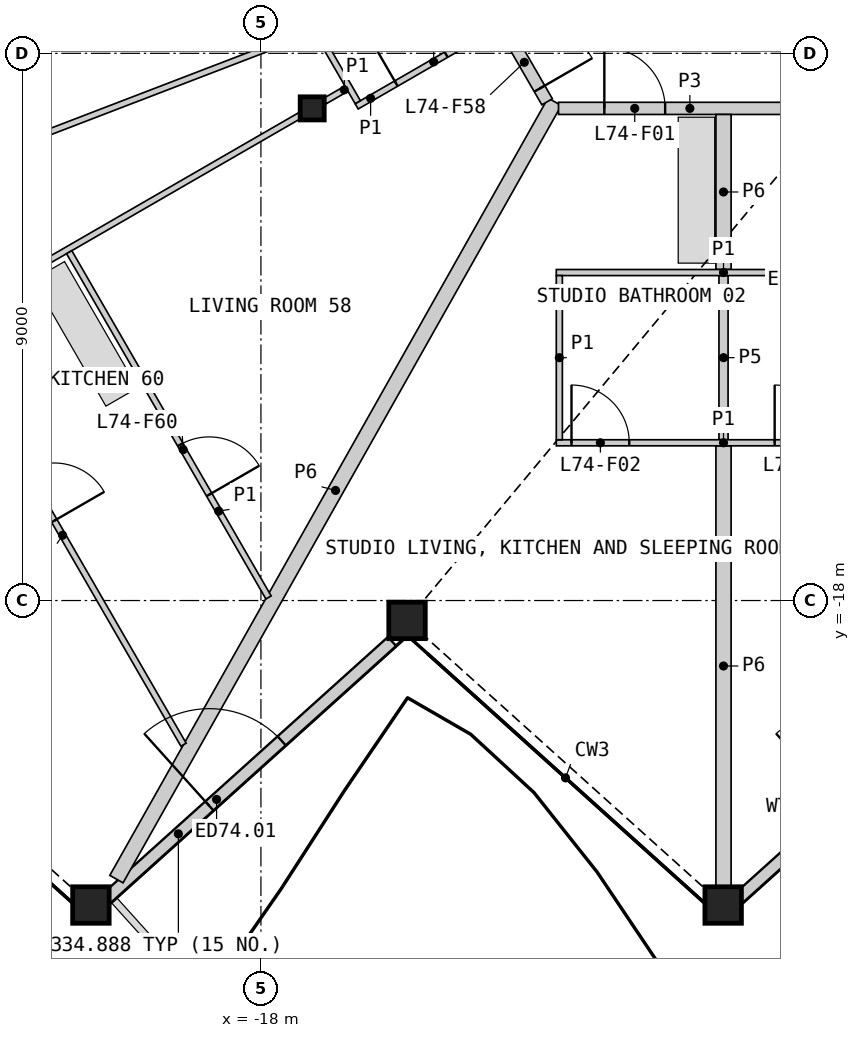
"""IFC4 building model, lengths in metres.
Left out: names, types, materials, properties, quantities, classifications, styles, units other than length and angle.
Written with IfcOpenShell. Run it as: python <this file> out.ifc"""

import sys

from ifc_helpers import new_model, si_unit, direction, frame, frame_2d, origin, origin_2d, place, context, subcontext, project, spatial, rectangle, hollow_rectangle, i_section, extrude, element, fill, save


model = new_model("IFC4")
c1 = context("Model", 3, precision=1e-05, world=origin(), true_north=direction((0.0, 1.0)))
c2 = subcontext(c1, "Body", "Model", "MODEL_VIEW")
j1 = project(units=[si_unit("LENGTHUNIT", "METRE"), si_unit("PLANEANGLEUNIT", "RADIAN")], contexts=[c1])
p1 = place(None, origin())
s1 = spatial("IfcSite", under=j1, at=p1, CompositionType="ELEMENT")
p2 = place(p1, origin())
s2 = spatial("IfcBuilding", under=s1, at=p2, CompositionType="ELEMENT")
p3 = place(p2, frame((0.0, 0.0, 332.4)))
s3 = spatial("IfcBuildingStorey", under=s2, at=p3, CompositionType="ELEMENT", Elevation=332.4)
for number, where, z_axis, x_axis in (
    (1, (-20.796, -23.008, 0.0), (0.0, 0.0, 1.0), (1.0, 0.0, 0.0)),
    (2, (-15.597, -18.327, 0.0), (0.0, 0.0, 1.0), (1.0, 0.0, 0.0)),
    (3, (-10.398, -23.008, 0.0), (0.0, 0.0, 1.0), (1.0, 0.0, 0.0)),
):
    element("IfcColumn", number, at=place(p3, frame(where, z_axis=z_axis, x_axis=x_axis)), inside=s3, PredefinedType="COLUMN", context=c2, shape_type="SweptSolid", body=[
        extrude(hollow_rectangle(XDim=0.6, YDim=0.6, WallThickness=0.04, at=origin_2d()), origin(), (0.0, 0.0, 1.0), 3.4),
    ])
p4 = place(p3, frame((-17.157, -9.906, 0.0), z_axis=(0.0, 0.0, 1.0), x_axis=(1.0, 0.0, 0.0)))
e4 = element("IfcColumn", 4, at=p4, inside=s3, PredefinedType="COLUMN", context=c2, shape_type="SweptSolid", body=[
    extrude(i_section(OverallWidth=0.396, OverallDepth=0.381, WebThickness=0.019, FlangeThickness=0.03, at=origin_2d()), origin(), (0.0, 0.0, 1.0), 3.4),
])
p5 = place(p3, frame((-20.53, -22.892, 0.0), z_axis=(0.0, 0.0, 1.0), x_axis=(0.743134328827, 0.669142263887, 0.0)))
e5 = element("IfcWall", 5, at=p5, inside=s3, PredefinedType="SOLIDWALL", context=c2, shape_type="SweptSolid", body=[
    extrude(rectangle(XDim=6.305, YDim=0.2, at=frame_2d((3.153, 0.0))), origin(), (0.0, 0.0, 1.0), 2.488),
])
p6 = place(p5, frame((2.262, 0.0, 0.0)))
e6 = element("IfcOpeningElement", 6, at=p6, cuts=e5, PredefinedType="OPENING", context=c2, shape_type="SweptSolid", body=[
    extrude(rectangle(XDim=1.6, YDim=2.25, at=frame_2d((0.8, 1.125))), frame((0.0, 0.11, 0.0), z_axis=(0.0, -1.0, 0.0), x_axis=(1.0, 0.0, 0.0)), (0.0, 0.0, 1.0), 0.22),
])
p7 = place(p3, frame((-10.137, -22.892, 0.0), z_axis=(0.0, 0.0, 1.0), x_axis=(0.743147981531, 0.669127101189, 0.0)))
e7 = element("IfcWall", 7, at=p7, inside=s3, PredefinedType="SOLIDWALL", context=c2, shape_type="SweptSolid", body=[
    extrude(rectangle(XDim=6.313, YDim=0.2, at=frame_2d((3.156, 0.0))), origin(), (0.0, 0.0, 1.0), 2.488),
])
p8 = place(p7, frame((2.262, 0.0, 0.0)))
e8 = element("IfcOpeningElement", 8, at=p8, cuts=e7, PredefinedType="OPENING", context=c2, shape_type="SweptSolid", body=[
    extrude(rectangle(XDim=1.6, YDim=2.25, at=frame_2d((0.8, 1.125))), frame((0.0, 0.11, 0.0), z_axis=(0.0, -1.0, 0.0), x_axis=(1.0, 0.0, 0.0)), (0.0, 0.0, 1.0), 0.22),
])
p9 = place(p3, frame((-20.376, -22.582, 0.0), z_axis=(0.0, 0.0, 1.0), x_axis=(0.491057132664, 0.871127368678, 0.0)))
e9 = element("IfcWall", 9, at=p9, inside=s3, PredefinedType="PARTITIONING", context=c2, shape_type="SweptSolid", body=[
    extrude(rectangle(XDim=14.677, YDim=0.25, at=frame_2d((7.338, 0.0))), origin(), (0.0, 0.0, 1.0), 2.33),
])
p10 = place(p3, frame((-10.393, -22.698, 0.0), z_axis=(0.0, 0.0, 1.0), x_axis=(0.0, 1.0, 0.0)))
e10 = element("IfcWall", 10, at=p10, inside=s3, PredefinedType="PARTITIONING", context=c2, shape_type="SweptSolid", body=[
    extrude(rectangle(XDim=7.242, YDim=0.25, at=frame_2d((3.621, 0.0))), origin(), (0.0, 0.0, 1.0), 2.33),
])
p11 = place(p3, frame((-13.106, -9.906, 0.0), z_axis=(0.0, 0.0, 1.0), x_axis=(1.0, 0.0, 0.0)))
e11 = element("IfcWall", 11, at=p11, inside=s3, PredefinedType="PARTITIONING", context=c2, shape_type="SweptSolid", body=[
    extrude(rectangle(XDim=4.32, YDim=0.2, at=frame_2d((2.16, 0.0))), origin(), (0.0, 0.0, 1.0), 3.1),
])
p12 = place(p11, frame((0.753, 0.0, 0.0)))
e12 = element("IfcOpeningElement", 12, at=p12, cuts=e11, PredefinedType="OPENING", context=c2, shape_type="SweptSolid", body=[
    extrude(rectangle(XDim=1.0, YDim=2.1, at=frame_2d((0.5, 1.05))), frame((0.0, 0.11, 0.0), z_axis=(0.0, -1.0, 0.0), x_axis=(1.0, 0.0, 0.0)), (0.0, 0.0, 1.0), 0.22),
])
p13 = place(p3, frame((-15.131, -6.614, 0.0), z_axis=(0.0, 0.0, 1.0), x_axis=(0.499967746641, -0.866044024469, 0.0)))
e13 = element("IfcWall", 13, at=p13, inside=s3, PredefinedType="PARTITIONING", context=c2, shape_type="SweptSolid", body=[
    extrude(rectangle(XDim=3.676, YDim=0.2, at=frame_2d((1.838, 0.0))), origin(), (0.0, 0.0, 1.0), 3.1),
])
p14 = place(p13, frame((2.426, 0.0, 0.0)))
e14 = element("IfcOpeningElement", 14, at=p14, cuts=e13, PredefinedType="OPENING", context=c2, shape_type="SweptSolid", body=[
    extrude(rectangle(XDim=1.0, YDim=2.1, at=frame_2d((0.5, 1.05))), frame((0.0, 0.11, 0.0), z_axis=(0.0, -1.0, 0.0), x_axis=(1.0, 0.0, 0.0)), (0.0, 0.0, 1.0), 0.22),
])
p15 = place(p3, frame((-10.393, -12.556, 0.0), z_axis=(0.0, 0.0, 1.0), x_axis=(0.0, 1.0, 0.0)))
e15 = element("IfcWall", 15, at=p15, inside=s3, PredefinedType="PARTITIONING", context=c2, shape_type="SweptSolid", body=[
    extrude(rectangle(XDim=2.55, YDim=0.25, at=frame_2d((1.275, 0.0))), origin(), (0.0, 0.0, 1.0), 2.33),
])
p16 = place(p3, frame((-10.393, -15.356, 0.0), z_axis=(0.0, 0.0, 1.0), x_axis=(0.0, 1.0, 0.0)))
e16 = element("IfcWall", 16, at=p16, inside=s3, PredefinedType="PLUMBINGWALL", context=c2, shape_type="SweptSolid", body=[
    extrude(rectangle(XDim=2.7, YDim=0.15, at=frame_2d((1.35, 0.0))), origin(), (0.0, 0.0, 1.0), 2.33),
])
p17 = place(p3, frame((-28.631, -13.039, 0.0), z_axis=(0.0, 0.0, 1.0), x_axis=(0.933581130309, 0.358366116048, 0.0)))
e17 = element("IfcWall", 17, at=p17, inside=s3, PredefinedType="PARTITIONING", context=c2, shape_type="SweptSolid", body=[
    extrude(rectangle(XDim=12.306, YDim=0.1, at=frame_2d((6.153, 0.0))), origin(), (0.0, 0.0, 1.0), 2.33),
])
p18 = place(p17, frame((5.276, 0.0, 0.0)))
e18 = element("IfcOpeningElement", 18, at=p18, cuts=e17, PredefinedType="OPENING", context=c2, shape_type="SweptSolid", body=[
    extrude(rectangle(XDim=0.95, YDim=2.1, at=frame_2d((0.475, 1.05))), frame((0.0, 0.06, 0.0), z_axis=(0.0, -1.0, 0.0), x_axis=(1.0, 0.0, 0.0)), (0.0, 0.0, 1.0), 0.12),
])
p19 = place(p3, frame((-27.122, -15.659, 0.0), z_axis=(0.0, 0.0, 1.0), x_axis=(0.866021046153, 0.500007547564, 0.0)))
e19 = element("IfcWall", 19, at=p19, inside=s3, PredefinedType="PARTITIONING", context=c2, shape_type="SweptSolid", body=[
    extrude(rectangle(XDim=11.267, YDim=0.1, at=frame_2d((5.634, 0.0))), origin(), (0.0, 0.0, 1.0), 2.33),
])
p20 = place(p19, frame((1.552, 0.0, 0.0)))
e20 = element("IfcOpeningElement", 20, at=p20, cuts=e19, PredefinedType="OPENING", context=c2, shape_type="SweptSolid", body=[
    extrude(rectangle(XDim=0.95, YDim=2.1, at=frame_2d((0.475, 1.05))), frame((0.0, 0.06, 0.0), z_axis=(0.0, -1.0, 0.0), x_axis=(1.0, 0.0, 0.0)), (0.0, 0.0, 1.0), 0.12),
])
p21 = place(p3, frame((-23.251, -13.482, 0.0), z_axis=(0.0, 0.0, 1.0), x_axis=(0.500017325895, -0.866015400443, 0.0)))
e21 = element("IfcWall", 21, at=p21, inside=s3, PredefinedType="PARTITIONING", context=c2, shape_type="SweptSolid", body=[
    extrude(rectangle(XDim=7.955, YDim=0.1, at=frame_2d((3.978, 0.0))), origin(), (0.0, 0.0, 1.0), 2.33),
])
p22 = place(p21, frame((2.752, 0.0, 0.0)))
e22 = element("IfcOpeningElement", 22, at=p22, cuts=e21, PredefinedType="OPENING", context=c2, shape_type="SweptSolid", body=[
    extrude(rectangle(XDim=0.95, YDim=2.1, at=frame_2d((0.475, 1.05))), frame((0.0, 0.06, 0.0), z_axis=(0.0, -1.0, 0.0), x_axis=(1.0, 0.0, 0.0)), (0.0, 0.0, 1.0), 0.12),
])
p23 = place(p3, frame((-21.154, -12.271, 0.0), z_axis=(0.0, 0.0, 1.0), x_axis=(0.500011451804, -0.866018791981, 0.0)))
e23 = element("IfcWall", 23, at=p23, inside=s3, PredefinedType="PARTITIONING", context=c2, shape_type="SweptSolid", body=[
    extrude(rectangle(XDim=6.557, YDim=0.1, at=frame_2d((3.278, 0.0))), origin(), (0.0, 0.0, 1.0), 2.33),
])
p24 = place(p23, frame((3.655, 0.0, 0.0)))
e24 = element("IfcOpeningElement", 24, at=p24, cuts=e23, PredefinedType="OPENING", context=c2, shape_type="SweptSolid", body=[
    extrude(rectangle(XDim=0.95, YDim=2.1, at=frame_2d((0.475, 1.05))), frame((0.0, 0.06, 0.0), z_axis=(0.0, -1.0, 0.0), x_axis=(1.0, 0.0, 0.0)), (0.0, 0.0, 1.0), 0.12),
])
p25 = place(p3, frame((-13.143, -12.606, 0.0), z_axis=(0.0, 0.0, 1.0), x_axis=(1.0, 0.0, 0.0)))
e25 = element("IfcWall", 25, at=p25, inside=s3, PredefinedType="PARTITIONING", context=c2, shape_type="SweptSolid", body=[
    extrude(rectangle(XDim=5.5, YDim=0.1, at=frame_2d((2.75, 0.0))), origin(), (0.0, 0.0, 1.0), 2.33),
])
p26 = place(p3, frame((-13.143, -15.406, 0.0), z_axis=(0.0, 0.0, 1.0), x_axis=(1.0, 0.0, 0.0)))
e26 = element("IfcWall", 26, at=p26, inside=s3, PredefinedType="PARTITIONING", context=c2, shape_type="SweptSolid", body=[
    extrude(rectangle(XDim=5.5, YDim=0.1, at=frame_2d((2.75, 0.0))), origin(), (0.0, 0.0, 1.0), 2.33),
])
p27 = place(p26, frame((0.25, 0.0, 0.0)))
e27 = element("IfcOpeningElement", 27, at=p27, cuts=e26, PredefinedType="OPENING", context=c2, shape_type="SweptSolid", body=[
    extrude(rectangle(XDim=0.95, YDim=2.1, at=frame_2d((0.475, 1.05))), frame((0.0, 0.06, 0.0), z_axis=(0.0, -1.0, 0.0), x_axis=(1.0, 0.0, 0.0)), (0.0, 0.0, 1.0), 0.12),
])
p28 = place(p26, frame((3.591, 0.0, 0.0)))
e28 = element("IfcOpeningElement", 28, at=p28, cuts=e26, PredefinedType="OPENING", context=c2, shape_type="SweptSolid", body=[
    extrude(rectangle(XDim=0.95, YDim=2.1, at=frame_2d((0.475, 1.05))), frame((0.0, 0.06, 0.0), z_axis=(0.0, -1.0, 0.0), x_axis=(1.0, 0.0, 0.0)), (0.0, 0.0, 1.0), 0.12),
])
p29 = place(p3, frame((-13.093, -15.356, 0.0), z_axis=(0.0, 0.0, 1.0), x_axis=(0.0, 1.0, 0.0)))
e29 = element("IfcWall", 29, at=p29, inside=s3, PredefinedType="PARTITIONING", context=c2, shape_type="SweptSolid", body=[
    extrude(rectangle(XDim=2.7, YDim=0.1, at=frame_2d((1.35, 0.0))), origin(), (0.0, 0.0, 1.0), 2.33),
])
p30 = place(p3, frame((-16.426, -9.872, 0.0), z_axis=(0.0, 0.0, 1.0), x_axis=(0.866029095148, 0.499993606316, 0.0)))
e30 = element("IfcWall", 30, at=p30, inside=s3, PredefinedType="PARTITIONING", context=c2, shape_type="SweptSolid", body=[
    extrude(rectangle(XDim=2.65, YDim=0.1, at=frame_2d((1.325, 0.0))), origin(), (0.0, 0.0, 1.0), 2.33),
])
p31 = place(p30, frame((0.75, 0.0, 0.0)))
e31 = element("IfcOpeningElement", 31, at=p31, cuts=e30, PredefinedType="OPENING", context=c2, shape_type="SweptSolid", body=[
    extrude(rectangle(XDim=0.95, YDim=2.1, at=frame_2d((0.475, 1.05))), frame((0.0, 0.06, 0.0), z_axis=(0.0, -1.0, 0.0), x_axis=(1.0, 0.0, 0.0)), (0.0, 0.0, 1.0), 0.12),
])
p32 = place(p3, frame((-17.507, -7.899, 0.0), z_axis=(0.0, 0.0, 1.0), x_axis=(0.499946605688, -0.86605622881, 0.0)))
e32 = element("IfcWall", 32, at=p32, inside=s3, PredefinedType="PARTITIONING", context=c2, shape_type="SweptSolid", body=[
    extrude(rectangle(XDim=2.2, YDim=0.1, at=frame_2d((1.1, 0.0))), origin(), (0.0, 0.0, 1.0), 2.33),
])
p33 = place(p3, frame((-16.949, -9.786, 0.0), z_axis=(0.0, 0.0, 1.0), x_axis=(0.866036909293, 0.499980071345, 0.0)))
e33 = element("IfcWall", 33, at=p33, inside=s3, PredefinedType="PARTITIONING", context=c2, shape_type="SweptSolid", body=[
    extrude(rectangle(XDim=0.41, YDim=0.1, at=frame_2d((0.205, 0.0))), origin(), (0.0, 0.0, 1.0), 2.33),
])
p34 = place(p6, origin())
e34 = element("IfcDoor", 34, at=p34, inside=s3, OperationType="DOUBLE_DOOR_SINGLE_SWING", PredefinedType="DOOR", context=c2, shape_type="SweptSolid", body=[
    extrude(rectangle(XDim=1.6, YDim=2.25, at=frame_2d((0.8, 1.125))), frame((0.0, 0.025, 0.0), z_axis=(0.0, -1.0, 0.0), x_axis=(1.0, 0.0, 0.0)), (0.0, 0.0, 1.0), 0.05),
])
fill(e6, e34)
p35 = place(p12, origin())
e35 = element("IfcDoor", 35, at=p35, inside=s3, OperationType="SINGLE_SWING_LEFT", PredefinedType="DOOR", context=c2, shape_type="SweptSolid", body=[
    extrude(rectangle(XDim=1.0, YDim=2.1, at=frame_2d((0.5, 1.05))), frame((0.0, 0.025, 0.0), z_axis=(0.0, -1.0, 0.0), x_axis=(1.0, 0.0, 0.0)), (0.0, 0.0, 1.0), 0.05),
])
fill(e12, e35)
p36 = place(p27, origin())
e36 = element("IfcDoor", 36, at=p36, inside=s3, OperationType="SINGLE_SWING_LEFT", PredefinedType="DOOR", context=c2, shape_type="SweptSolid", body=[
    extrude(rectangle(XDim=0.95, YDim=2.1, at=frame_2d((0.475, 1.05))), frame((0.0, 0.025, 0.0), z_axis=(0.0, -1.0, 0.0), x_axis=(1.0, 0.0, 0.0)), (0.0, 0.0, 1.0), 0.05),
])
fill(e27, e36)
p37 = place(p28, origin())
e37 = element("IfcDoor", 37, at=p37, inside=s3, OperationType="SINGLE_SWING_LEFT", PredefinedType="DOOR", context=c2, shape_type="SweptSolid", body=[
    extrude(rectangle(XDim=0.95, YDim=2.1, at=frame_2d((0.475, 1.05))), frame((0.0, 0.025, 0.0), z_axis=(0.0, -1.0, 0.0), x_axis=(1.0, 0.0, 0.0)), (0.0, 0.0, 1.0), 0.05),
])
fill(e28, e37)
p38 = place(p14, origin())
e38 = element("IfcDoor", 38, at=p38, inside=s3, OperationType="SINGLE_SWING_RIGHT", PredefinedType="DOOR", context=c2, shape_type="SweptSolid", body=[
    extrude(rectangle(XDim=1.0, YDim=2.1, at=frame_2d((0.5, 1.05))), frame((0.0, 0.025, 0.0), z_axis=(0.0, -1.0, 0.0), x_axis=(1.0, 0.0, 0.0)), (0.0, 0.0, 1.0), 0.05),
])
fill(e14, e38)
p39 = place(p31, origin())
e39 = element("IfcDoor", 39, at=p39, inside=s3, OperationType="SINGLE_SWING_LEFT", PredefinedType="DOOR", context=c2, shape_type="SweptSolid", body=[
    extrude(rectangle(XDim=0.95, YDim=2.1, at=frame_2d((0.475, 1.05))), frame((0.0, 0.025, 0.0), z_axis=(0.0, -1.0, 0.0), x_axis=(1.0, 0.0, 0.0)), (0.0, 0.0, 1.0), 0.05),
])
fill(e31, e39)
p40 = place(p24, origin())
e40 = element("IfcDoor", 40, at=p40, inside=s3, OperationType="SINGLE_SWING_RIGHT", PredefinedType="DOOR", context=c2, shape_type="SweptSolid", body=[
    extrude(rectangle(XDim=0.95, YDim=2.1, at=frame_2d((0.475, 1.05))), frame((0.0, 0.025, 0.0), z_axis=(0.0, -1.0, 0.0), x_axis=(1.0, 0.0, 0.0)), (0.0, 0.0, 1.0), 0.05),
])
fill(e24, e40)
p41 = place(p22, origin())
e41 = element("IfcDoor", 41, at=p41, inside=s3, OperationType="SINGLE_SWING_RIGHT", PredefinedType="DOOR", context=c2, shape_type="SweptSolid", body=[
    extrude(rectangle(XDim=0.95, YDim=2.1, at=frame_2d((0.475, 1.05))), frame((0.0, 0.025, 0.0), z_axis=(0.0, -1.0, 0.0), x_axis=(1.0, 0.0, 0.0)), (0.0, 0.0, 1.0), 0.05),
])
fill(e22, e41)
save(model, sys.argv[1])
